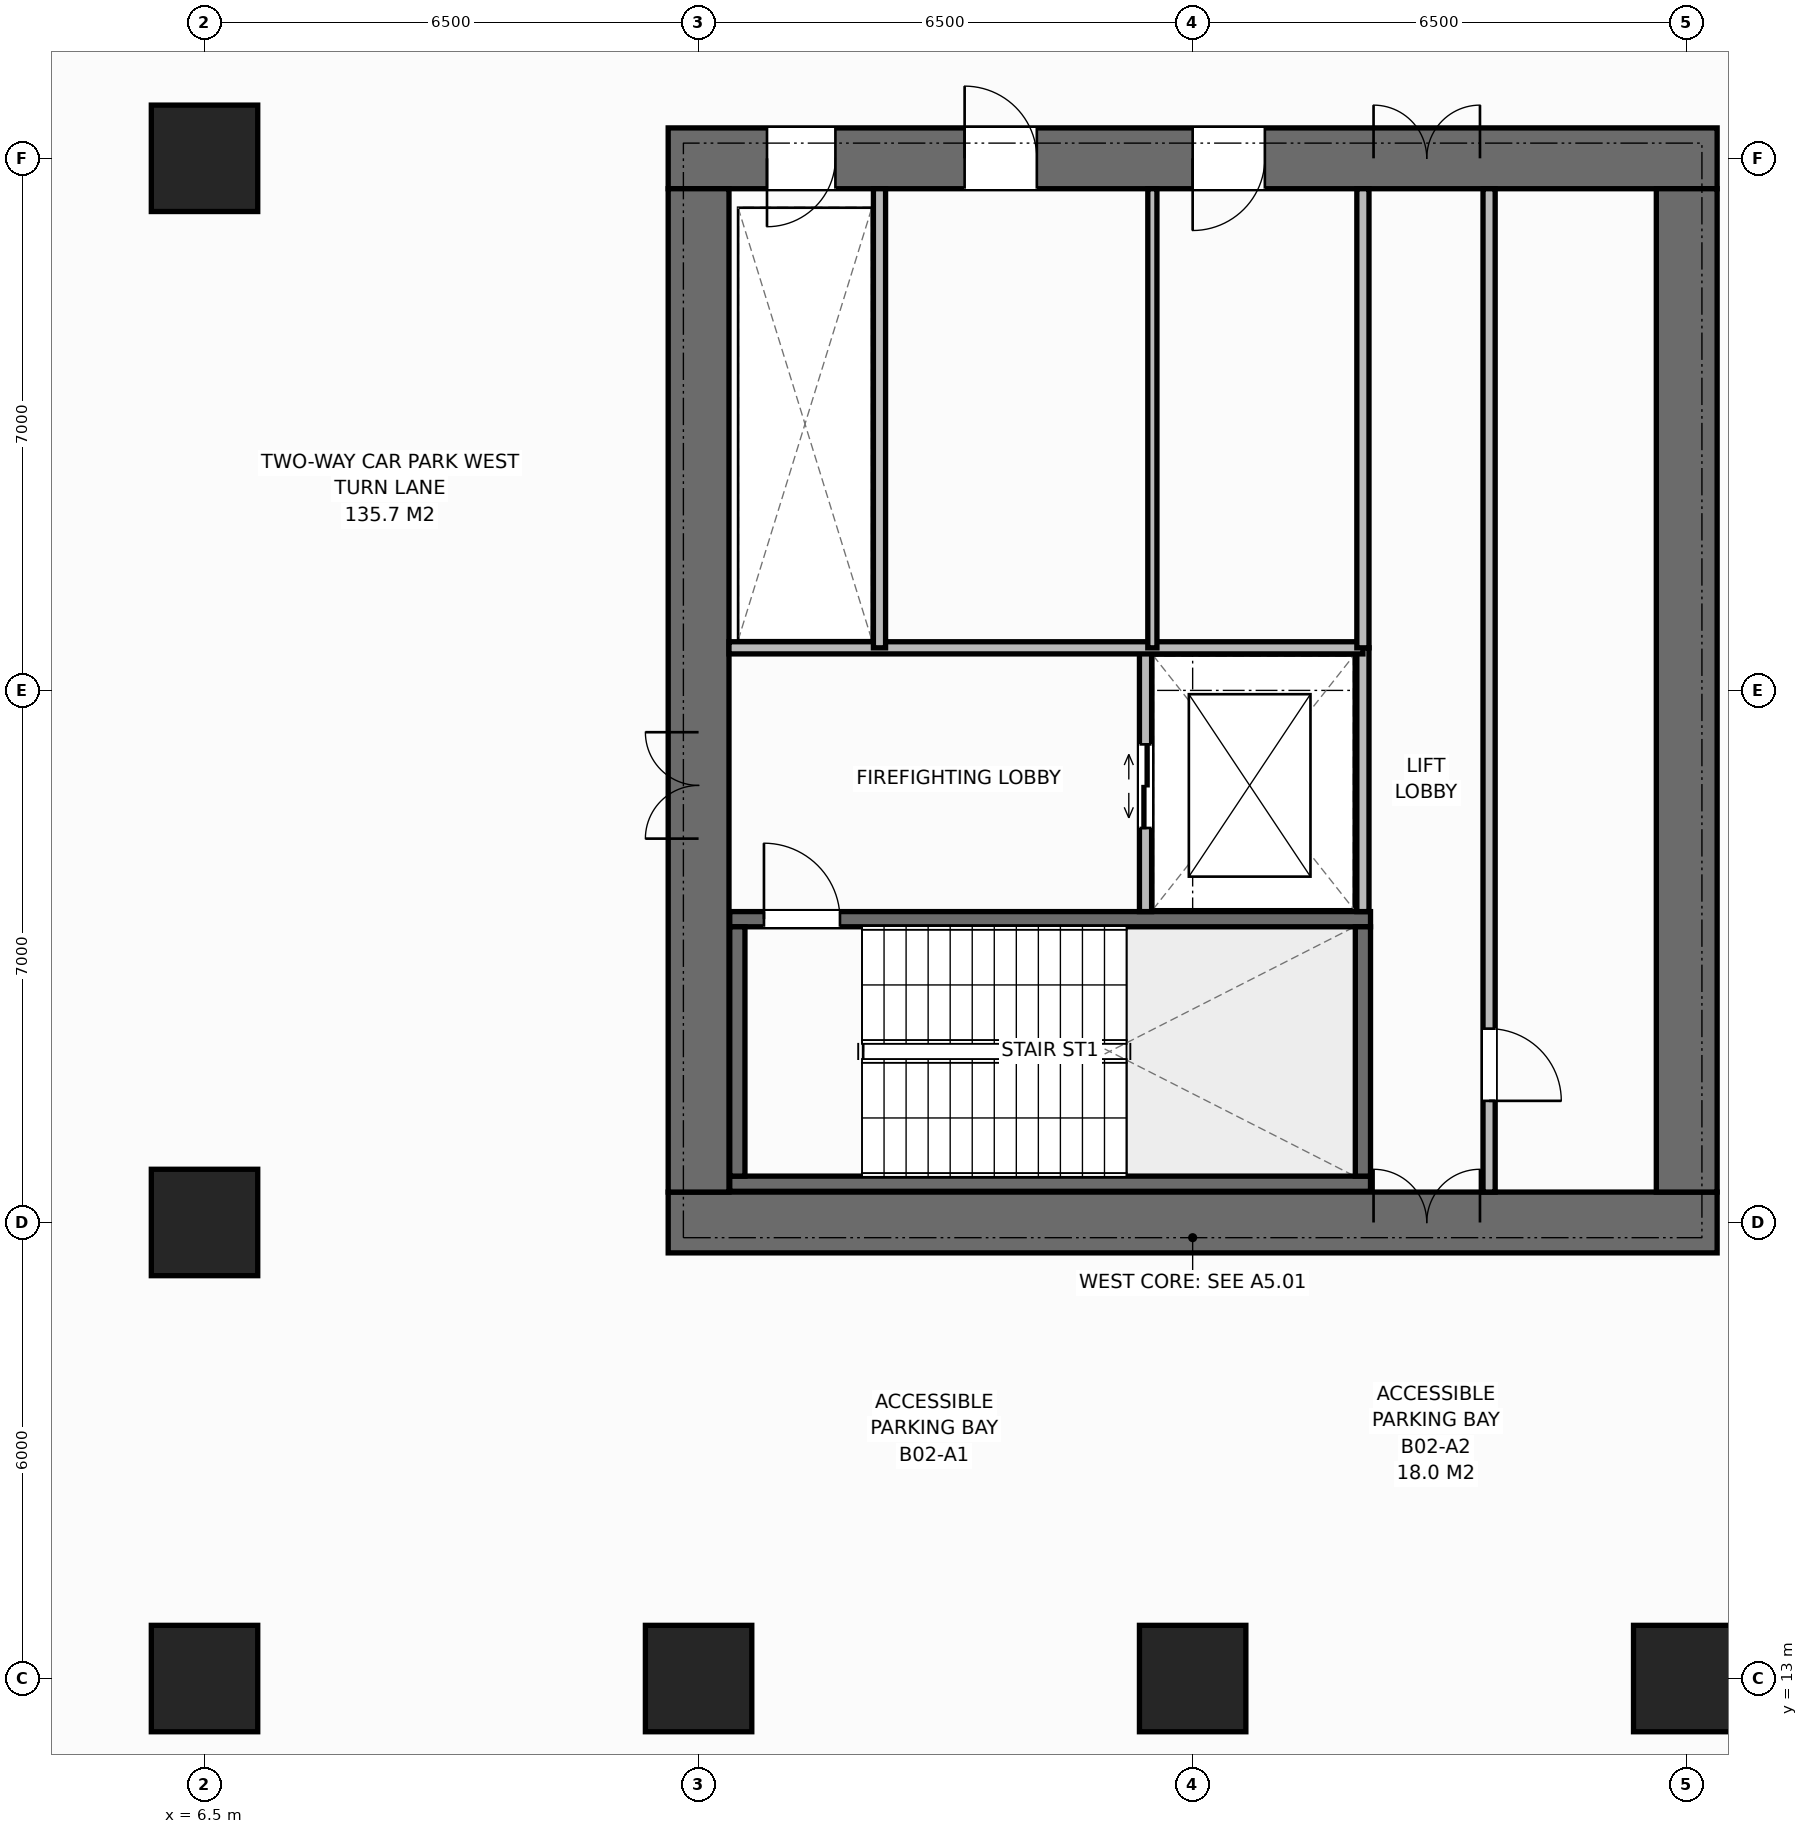
"""IFC4 building model, lengths in metres.
Left out: names, types, materials, properties, quantities, classifications, styles, units other than length and angle.
Written with IfcOpenShell. Run it as: python <this file> out.ifc"""

import sys

from ifc_helpers import new_model, si_unit, direction, frame, frame_2d, origin, origin_2d, place, context, subcontext, project, spatial, rectangle, extrude, element, fill, save


model = new_model("IFC4")
c1 = context("Model", 3, precision=1e-05, world=origin(), true_north=direction((0.0, 1.0)))
c2 = subcontext(c1, "Body", "Model", "MODEL_VIEW")
j1 = project(units=[si_unit("LENGTHUNIT", "METRE"), si_unit("PLANEANGLEUNIT", "RADIAN")], contexts=[c1])
p1 = place(None, origin())
s1 = spatial("IfcSite", under=j1, at=p1, CompositionType="ELEMENT")
p2 = place(p1, origin())
s2 = spatial("IfcBuilding", under=s1, at=p2, CompositionType="ELEMENT")
p3 = place(p2, frame((0.0, 0.0, -9.0)))
s3 = spatial("IfcBuildingStorey", under=s2, at=p3, CompositionType="ELEMENT", Elevation=-9.0)
p4 = place(p3, frame((12.6, 19.0, 0.0), z_axis=(0.0, 0.0, 1.0), x_axis=(1.0, 0.0, 0.0)))
e1 = element("IfcWall", 1, at=p4, inside=s3, PredefinedType="SHEAR", context=c2, shape_type="SweptSolid", body=[
    extrude(rectangle(XDim=13.8, YDim=0.8, at=frame_2d((6.9, 0.0))), origin(), (0.0, 0.0, 1.0), 4.5),
])
p5 = place(p4, frame((9.28, 0.0, 0.0)))
e2 = element("IfcOpeningElement", 2, at=p5, cuts=e1, PredefinedType="OPENING", context=c2, shape_type="SweptSolid", body=[
    extrude(rectangle(XDim=1.4, YDim=2.2, at=frame_2d((0.7, 1.1))), frame((0.0, 0.41, 0.0), z_axis=(0.0, -1.0, 0.0), x_axis=(1.0, 0.0, 0.0)), (0.0, 0.0, 1.0), 0.82),
])
p6 = place(p3, frame((12.6, 33.0, 0.0), z_axis=(0.0, 0.0, 1.0), x_axis=(1.0, 0.0, 0.0)))
e3 = element("IfcWall", 3, at=p6, inside=s3, PredefinedType="SHEAR", context=c2, shape_type="SweptSolid", body=[
    extrude(rectangle(XDim=13.8, YDim=0.8, at=frame_2d((6.9, 0.0))), origin(), (0.0, 0.0, 1.0), 4.5),
])
p7 = place(p6, frame((1.3, 0.0, 0.0)))
e4 = element("IfcOpeningElement", 4, at=p7, cuts=e3, PredefinedType="OPENING", context=c2, shape_type="SweptSolid", body=[
    extrude(rectangle(XDim=0.9, YDim=2.15, at=frame_2d((0.45, 1.075))), frame((0.0, 0.41, 0.0), z_axis=(0.0, -1.0, 0.0), x_axis=(1.0, 0.0, 0.0)), (0.0, 0.0, 1.0), 0.82),
])
p8 = place(p6, frame((3.9, 0.0, 0.0)))
e5 = element("IfcOpeningElement", 5, at=p8, cuts=e3, PredefinedType="OPENING", context=c2, shape_type="SweptSolid", body=[
    extrude(rectangle(XDim=0.95, YDim=2.15, at=frame_2d((0.475, 1.075))), frame((0.0, 0.41, 0.0), z_axis=(0.0, -1.0, 0.0), x_axis=(1.0, 0.0, 0.0)), (0.0, 0.0, 1.0), 0.82),
])
p9 = place(p6, frame((6.9, 0.0, 0.0)))
e6 = element("IfcOpeningElement", 6, at=p9, cuts=e3, PredefinedType="OPENING", context=c2, shape_type="SweptSolid", body=[
    extrude(rectangle(XDim=0.95, YDim=2.15, at=frame_2d((0.475, 1.075))), frame((0.0, 0.41, 0.0), z_axis=(0.0, -1.0, 0.0), x_axis=(1.0, 0.0, 0.0)), (0.0, 0.0, 1.0), 0.82),
])
p10 = place(p6, frame((9.28, 0.0, 0.0)))
e7 = element("IfcOpeningElement", 7, at=p10, cuts=e3, PredefinedType="OPENING", context=c2, shape_type="SweptSolid", body=[
    extrude(rectangle(XDim=1.4, YDim=2.2, at=frame_2d((0.7, 1.1))), frame((0.0, 0.41, 0.0), z_axis=(0.0, -1.0, 0.0), x_axis=(1.0, 0.0, 0.0)), (0.0, 0.0, 1.0), 0.82),
])
p11 = place(p3, frame((13.0, 19.4, 0.0), z_axis=(0.0, 0.0, 1.0), x_axis=(0.0, 1.0, 0.0)))
e8 = element("IfcWall", 8, at=p11, inside=s3, PredefinedType="SHEAR", context=c2, shape_type="SweptSolid", body=[
    extrude(rectangle(XDim=13.2, YDim=0.8, at=frame_2d((6.6, 0.0))), origin(), (0.0, 0.0, 1.0), 4.5),
])
p12 = place(p11, frame((4.65, 0.0, 0.0)))
e9 = element("IfcOpeningElement", 9, at=p12, cuts=e8, PredefinedType="OPENING", context=c2, shape_type="SweptSolid", body=[
    extrude(rectangle(XDim=1.4, YDim=2.2, at=frame_2d((0.7, 1.1))), frame((0.0, 0.41, 0.0), z_axis=(0.0, -1.0, 0.0), x_axis=(1.0, 0.0, 0.0)), (0.0, 0.0, 1.0), 0.82),
])
p13 = place(p3, frame((26.0, 19.4, 0.0), z_axis=(0.0, 0.0, 1.0), x_axis=(0.0, 1.0, 0.0)))
e10 = element("IfcWall", 10, at=p13, inside=s3, PredefinedType="SHEAR", context=c2, shape_type="SweptSolid", body=[
    extrude(rectangle(XDim=13.2, YDim=0.8, at=frame_2d((6.6, 0.0))), origin(), (0.0, 0.0, 1.0), 4.5),
])
p14 = place(p3, frame((13.41, 19.51, 0.0), z_axis=(0.0, 0.0, 1.0), x_axis=(1.0, 0.0, 0.0)))
e11 = element("IfcWall", 11, at=p14, inside=s3, PredefinedType="SHEAR", context=c2, shape_type="SweptSolid", body=[
    extrude(rectangle(XDim=8.43, YDim=0.2, at=frame_2d((4.215, 0.0))), origin(), (0.0, 0.0, 1.0), 4.5),
])
p15 = place(p3, frame((13.41, 22.99, 0.0), z_axis=(0.0, 0.0, 1.0), x_axis=(1.0, 0.0, 0.0)))
e12 = element("IfcWall", 12, at=p15, inside=s3, PredefinedType="SHEAR", context=c2, shape_type="SweptSolid", body=[
    extrude(rectangle(XDim=8.43, YDim=0.2, at=frame_2d((4.215, 0.0))), origin(), (0.0, 0.0, 1.0), 4.5),
])
p16 = place(p15, frame((0.45, 0.0, 0.0)))
e13 = element("IfcOpeningElement", 13, at=p16, cuts=e12, PredefinedType="OPENING", context=c2, shape_type="SweptSolid", body=[
    extrude(rectangle(XDim=1.0, YDim=2.15, at=frame_2d((0.5, 1.075))), frame((0.0, 0.11, 0.0), z_axis=(0.0, -1.0, 0.0), x_axis=(1.0, 0.0, 0.0)), (0.0, 0.0, 1.0), 0.22),
])
for number, where, z_axis, x_axis in (
    (14, (13.51, 19.61, 0.0), (0.0, 0.0, 1.0), (0.0, 1.0, 0.0)),
    (15, (21.74, 19.61, 0.0), (0.0, 0.0, 1.0), (0.0, 1.0, 0.0)),
):
    element("IfcWall", number, at=place(p3, frame(where, z_axis=z_axis, x_axis=x_axis)), inside=s3, PredefinedType="SHEAR", context=c2, shape_type="SweptSolid", body=[
        extrude(rectangle(XDim=3.28, YDim=0.2, at=frame_2d((1.64, 0.0))), origin(), (0.0, 0.0, 1.0), 4.5),
    ])
for number, where, z_axis, x_axis in (
    (16, (6.5, 19.0, 0.0), (0.0, 0.0, 1.0), (1.0, 0.0, 0.0)),
    (17, (6.5, 33.0, 0.0), (0.0, 0.0, 1.0), (1.0, 0.0, 0.0)),
    (18, (6.5, 13.0, 0.0), (0.0, 0.0, 1.0), (1.0, 0.0, 0.0)),
    (19, (13.0, 13.0, 0.0), (0.0, 0.0, 1.0), (1.0, 0.0, 0.0)),
    (20, (19.5, 13.0, 0.0), (0.0, 0.0, 1.0), (1.0, 0.0, 0.0)),
    (21, (26.0, 13.0, 0.0), (0.0, 0.0, 1.0), (1.0, 0.0, 0.0)),
):
    element("IfcColumn", number, at=place(p3, frame(where, z_axis=z_axis, x_axis=x_axis)), inside=s3, PredefinedType="COLUMN", context=c2, shape_type="SweptSolid", body=[
        extrude(rectangle(XDim=1.4, YDim=1.4, at=origin_2d()), origin(), (0.0, 0.0, 1.0), 4.5),
    ])
p17 = place(p3, frame((21.74, 23.09, 0.0), z_axis=(0.0, 0.0, 1.0), x_axis=(0.0, 1.0, 0.0)))
e22 = element("IfcWall", 22, at=p17, inside=s3, PredefinedType="STANDARD", context=c2, shape_type="SweptSolid", body=[
    extrude(rectangle(XDim=3.47, YDim=0.16, at=frame_2d((1.735, 0.0))), origin(), (0.0, 0.0, 1.0), 4.2),
])
p18 = place(p3, frame((18.88, 23.09, 0.0), z_axis=(0.0, 0.0, 1.0), x_axis=(0.0, 1.0, 0.0)))
e23 = element("IfcWall", 23, at=p18, inside=s3, PredefinedType="STANDARD", context=c2, shape_type="SweptSolid", body=[
    extrude(rectangle(XDim=3.47, YDim=0.16, at=frame_2d((1.735, 0.0))), origin(), (0.0, 0.0, 1.0), 4.2),
])
p19 = place(p18, frame((1.1, 0.0, 0.0)))
e24 = element("IfcOpeningElement", 24, at=p19, cuts=e23, PredefinedType="OPENING", context=c2, shape_type="SweptSolid", body=[
    extrude(rectangle(XDim=1.1, YDim=2.2, at=frame_2d((0.55, 1.1))), frame((0.0, 0.09, 0.0), z_axis=(0.0, -1.0, 0.0), x_axis=(1.0, 0.0, 0.0)), (0.0, 0.0, 1.0), 0.18),
])
p20 = place(p3, frame((13.4, 26.56, 0.0), z_axis=(0.0, 0.0, 1.0), x_axis=(1.0, 0.0, 0.0)))
e25 = element("IfcWall", 25, at=p20, inside=s3, PredefinedType="STANDARD", context=c2, shape_type="SweptSolid", body=[
    extrude(rectangle(XDim=8.34, YDim=0.16, at=frame_2d((4.17, 0.0))), origin(), (0.0, 0.0, 1.0), 4.2),
])
p21 = place(p3, frame((15.38, 26.56, 0.0), z_axis=(0.0, 0.0, 1.0), x_axis=(0.0, 1.0, 0.0)))
e26 = element("IfcWall", 26, at=p21, inside=s3, PredefinedType="STANDARD", context=c2, shape_type="SweptSolid", body=[
    extrude(rectangle(XDim=6.04, YDim=0.16, at=frame_2d((3.02, 0.0))), origin(), (0.0, 0.0, 1.0), 4.2),
])
p22 = place(p3, frame((18.97, 26.56, 0.0), z_axis=(0.0, 0.0, 1.0), x_axis=(0.0, 1.0, 0.0)))
e27 = element("IfcWall", 27, at=p22, inside=s3, PredefinedType="PARTITIONING", context=c2, shape_type="SweptSolid", body=[
    extrude(rectangle(XDim=6.04, YDim=0.12, at=frame_2d((3.02, 0.0))), origin(), (0.0, 0.0, 1.0), 4.2),
])
p23 = place(p3, frame((21.74, 26.56, 0.0), z_axis=(0.0, 0.0, 1.0), x_axis=(0.0, 1.0, 0.0)))
e28 = element("IfcWall", 28, at=p23, inside=s3, PredefinedType="STANDARD", context=c2, shape_type="SweptSolid", body=[
    extrude(rectangle(XDim=6.04, YDim=0.16, at=frame_2d((3.02, 0.0))), origin(), (0.0, 0.0, 1.0), 4.2),
])
p24 = place(p3, frame((23.4, 19.4, 0.0), z_axis=(0.0, 0.0, 1.0), x_axis=(0.0, 1.0, 0.0)))
e29 = element("IfcWall", 29, at=p24, inside=s3, PredefinedType="STANDARD", context=c2, shape_type="SweptSolid", body=[
    extrude(rectangle(XDim=13.2, YDim=0.16, at=frame_2d((6.6, 0.0))), origin(), (0.0, 0.0, 1.0), 4.2),
])
p25 = place(p24, frame((1.2, 0.0, 0.0)))
e30 = element("IfcOpeningElement", 30, at=p25, cuts=e29, PredefinedType="OPENING", context=c2, shape_type="SweptSolid", body=[
    extrude(rectangle(XDim=0.95, YDim=2.15, at=frame_2d((0.475, 1.075))), frame((0.0, 0.09, 0.0), z_axis=(0.0, -1.0, 0.0), x_axis=(1.0, 0.0, 0.0)), (0.0, 0.0, 1.0), 0.18),
])
p26 = place(p16, origin())
e31 = element("IfcDoor", 31, at=p26, inside=s3, OperationType="SINGLE_SWING_LEFT", PredefinedType="DOOR", context=c2, shape_type="SweptSolid", body=[
    extrude(rectangle(XDim=1.0, YDim=2.15, at=frame_2d((0.5, 1.075))), frame((0.0, 0.025, 0.0), z_axis=(0.0, -1.0, 0.0), x_axis=(1.0, 0.0, 0.0)), (0.0, 0.0, 1.0), 0.05),
])
fill(e13, e31)
p27 = place(p12, origin())
e32 = element("IfcDoor", 32, at=p27, inside=s3, OperationType="DOUBLE_DOOR_SINGLE_SWING", PredefinedType="DOOR", context=c2, shape_type="SweptSolid", body=[
    extrude(rectangle(XDim=1.4, YDim=2.2, at=frame_2d((0.7, 1.1))), frame((0.0, 0.025, 0.0), z_axis=(0.0, -1.0, 0.0), x_axis=(1.0, 0.0, 0.0)), (0.0, 0.0, 1.0), 0.05),
])
fill(e9, e32)
p28 = place(p19, origin())
e33 = element("IfcDoor", 33, at=p28, inside=s3, OperationType="DOUBLE_DOOR_SLIDING", PredefinedType="DOOR", context=c2, shape_type="SweptSolid", body=[
    extrude(rectangle(XDim=1.1, YDim=2.2, at=frame_2d((0.55, 1.1))), frame((0.0, 0.025, 0.0), z_axis=(0.0, -1.0, 0.0), x_axis=(1.0, 0.0, 0.0)), (0.0, 0.0, 1.0), 0.05),
])
fill(e24, e33)
p29 = place(p7, origin())
e34 = element("IfcDoor", 34, at=p29, inside=s3, OperationType="SINGLE_SWING_RIGHT", PredefinedType="DOOR", context=c2, shape_type="SweptSolid", body=[
    extrude(rectangle(XDim=0.9, YDim=2.15, at=frame_2d((0.45, 1.075))), frame((0.0, -0.075, 0.0), z_axis=(0.0, -1.0, 0.0), x_axis=(1.0, 0.0, 0.0)), (0.0, 0.0, 1.0), 0.05),
])
fill(e4, e34)
p30 = place(p8, origin())
e35 = element("IfcDoor", 35, at=p30, inside=s3, OperationType="SINGLE_SWING_LEFT", PredefinedType="DOOR", context=c2, shape_type="SweptSolid", body=[
    extrude(rectangle(XDim=0.95, YDim=2.15, at=frame_2d((0.475, 1.075))), frame((0.0, -0.075, 0.0), z_axis=(0.0, -1.0, 0.0), x_axis=(1.0, 0.0, 0.0)), (0.0, 0.0, 1.0), 0.05),
])
fill(e5, e35)
p31 = place(p9, origin())
e36 = element("IfcDoor", 36, at=p31, inside=s3, OperationType="SINGLE_SWING_RIGHT", PredefinedType="DOOR", context=c2, shape_type="SweptSolid", body=[
    extrude(rectangle(XDim=0.95, YDim=2.15, at=frame_2d((0.475, 1.075))), frame((0.0, -0.075, 0.0), z_axis=(0.0, -1.0, 0.0), x_axis=(1.0, 0.0, 0.0)), (0.0, 0.0, 1.0), 0.05),
])
fill(e6, e36)
p32 = place(p5, origin())
e37 = element("IfcDoor", 37, at=p32, inside=s3, OperationType="DOUBLE_DOOR_SINGLE_SWING", PredefinedType="DOOR", context=c2, shape_type="SweptSolid", body=[
    extrude(rectangle(XDim=1.4, YDim=2.2, at=frame_2d((0.7, 1.1))), frame((0.0, 0.125, 0.0), z_axis=(0.0, -1.0, 0.0), x_axis=(1.0, 0.0, 0.0)), (0.0, 0.0, 1.0), 0.05),
])
fill(e2, e37)
p33 = place(p10, origin())
e38 = element("IfcDoor", 38, at=p33, inside=s3, OperationType="DOUBLE_DOOR_SINGLE_SWING", PredefinedType="DOOR", context=c2, shape_type="SweptSolid", body=[
    extrude(rectangle(XDim=1.4, YDim=2.2, at=frame_2d((0.7, 1.1))), frame((0.0, -0.075, 0.0), z_axis=(0.0, -1.0, 0.0), x_axis=(1.0, 0.0, 0.0)), (0.0, 0.0, 1.0), 0.05),
])
fill(e7, e38)
p34 = place(p25, origin())
e39 = element("IfcDoor", 39, at=p34, inside=s3, OperationType="SINGLE_SWING_RIGHT", PredefinedType="DOOR", context=c2, shape_type="SweptSolid", body=[
    extrude(rectangle(XDim=0.95, YDim=2.15, at=frame_2d((0.475, 1.075))), frame((0.0, 0.025, 0.0), z_axis=(0.0, -1.0, 0.0), x_axis=(1.0, 0.0, 0.0)), (0.0, 0.0, 1.0), 0.05),
])
fill(e30, e39)
save(model, sys.argv[1])
